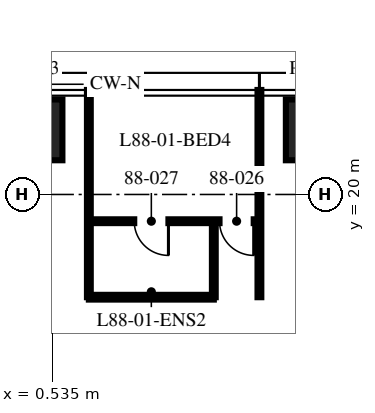
"""IFC4 building model, lengths in metres.
Left out: names, types, materials, properties, quantities, classifications, styles, units other than length and angle.
Written with IfcOpenShell. Run it as: python <this file> out.ifc"""

import sys

from ifc_helpers import new_model, si_unit, direction, frame, frame_2d, origin, origin_2d, place, context, subcontext, project, spatial, rectangle, extrude, element, fill, save


model = new_model("IFC4")
c1 = context("Model", 3, precision=1e-05, world=origin(), true_north=direction((0.0, 1.0)))
c2 = subcontext(c1, "Body", "Model", "MODEL_VIEW")
j1 = project(units=[si_unit("LENGTHUNIT", "METRE"), si_unit("PLANEANGLEUNIT", "RADIAN")], contexts=[c1])
p1 = place(None, origin())
s1 = spatial("IfcSite", under=j1, at=p1, CompositionType="ELEMENT")
p2 = place(p1, origin())
s2 = spatial("IfcBuilding", under=s1, at=p2, CompositionType="ELEMENT")
p3 = place(p2, frame((0.0, 0.0, 349.5)))
s3 = spatial("IfcBuildingStorey", under=s2, at=p3, CompositionType="ELEMENT", Elevation=349.5)
for number, where, z_axis, x_axis in (
    (1, (0.0, 21.7, 0.0), (0.0, 0.0, 1.0), (1.0, 0.0, 0.0)),
    (2, (7.48, 21.7, 0.0), (0.0, 0.0, 1.0), (1.0, 0.0, 0.0)),
):
    element("IfcColumn", number, at=place(p3, frame(where, z_axis=z_axis, x_axis=x_axis)), inside=s3, PredefinedType="COLUMN", context=c2, shape_type="SweptSolid", body=[
        extrude(rectangle(XDim=1.6, YDim=1.6, at=origin_2d()), origin(), (0.0, 0.0, 1.0), 3.75),
    ])
for number, where, z_axis, x_axis in (
    (3, (5.984, 17.296, 0.0), (0.0, 0.0, 1.0), (0.0, 1.0, 0.0)),
    (4, (1.496, 17.296, 0.0), (0.0, 0.0, 1.0), (0.0, 1.0, 0.0)),
):
    element("IfcWall", number, at=place(p3, frame(where, z_axis=z_axis, x_axis=x_axis)), inside=s3, PredefinedType="PARTITIONING", context=c2, shape_type="SweptSolid", body=[
        extrude(rectangle(XDim=5.454, YDim=0.1, at=frame_2d((2.727, 0.0))), origin(), (0.0, 0.0, 1.0), 2.85),
    ])
p4 = place(p3, frame((5.984, 19.296, 0.0), z_axis=(0.0, 0.0, 1.0), x_axis=(-1.0, 0.0, 0.0)))
e5 = element("IfcWall", 5, at=p4, inside=s3, PredefinedType="PARTITIONING", context=c2, shape_type="SweptSolid", body=[
    extrude(rectangle(XDim=4.488, YDim=0.1, at=frame_2d((2.244, 0.0))), origin(), (0.0, 0.0, 1.0), 2.56),
])
p5 = place(p4, frame((0.15, 0.0, 0.0)))
e6 = element("IfcOpeningElement", 6, at=p5, cuts=e5, PredefinedType="OPENING", context=c2, shape_type="SweptSolid", body=[
    extrude(rectangle(XDim=0.9, YDim=2.1, at=frame_2d((0.45, 1.05))), frame((0.0, 0.06, 0.0), z_axis=(0.0, -1.0, 0.0), x_axis=(1.0, 0.0, 0.0)), (0.0, 0.0, 1.0), 0.12),
])
p6 = place(p4, frame((2.394, 0.0, 0.0)))
e7 = element("IfcOpeningElement", 7, at=p6, cuts=e5, PredefinedType="OPENING", context=c2, shape_type="SweptSolid", body=[
    extrude(rectangle(XDim=0.9, YDim=2.1, at=frame_2d((0.45, 1.05))), frame((0.0, 0.06, 0.0), z_axis=(0.0, -1.0, 0.0), x_axis=(1.0, 0.0, 0.0)), (0.0, 0.0, 1.0), 0.12),
])
p7 = place(p3, frame((4.784, 17.296, 0.0), z_axis=(0.0, 0.0, 1.0), x_axis=(0.0, 1.0, 0.0)))
e8 = element("IfcWall", 8, at=p7, inside=s3, PredefinedType="PARTITIONING", context=c2, shape_type="SweptSolid", body=[
    extrude(rectangle(XDim=2.0, YDim=0.1, at=frame_2d((1.0, 0.0))), origin(), (0.0, 0.0, 1.0), 3.45),
])
p8 = place(p3, frame((4.784, 17.296, 0.0), z_axis=(0.0, 0.0, 1.0), x_axis=(-1.0, 0.0, 0.0)))
e9 = element("IfcWall", 9, at=p8, inside=s3, PredefinedType="PARTITIONING", context=c2, shape_type="SweptSolid", body=[
    extrude(rectangle(XDim=3.288, YDim=0.125, at=frame_2d((1.644, 0.0))), origin(), (0.0, 0.0, 1.0), 2.56),
])
p9 = place(p5, origin())
e10 = element("IfcDoor", 10, at=p9, inside=s3, OperationType="SINGLE_SWING_LEFT", PredefinedType="DOOR", context=c2, shape_type="SweptSolid", body=[
    extrude(rectangle(XDim=0.9, YDim=2.1, at=frame_2d((0.45, 1.05))), frame((0.0, 0.025, 0.0), z_axis=(0.0, -1.0, 0.0), x_axis=(1.0, 0.0, 0.0)), (0.0, 0.0, 1.0), 0.05),
])
fill(e6, e10)
p10 = place(p6, origin())
e11 = element("IfcDoor", 11, at=p10, inside=s3, OperationType="SINGLE_SWING_LEFT", PredefinedType="DOOR", context=c2, shape_type="SweptSolid", body=[
    extrude(rectangle(XDim=0.9, YDim=2.1, at=frame_2d((0.45, 1.05))), frame((0.0, 0.025, 0.0), z_axis=(0.0, -1.0, 0.0), x_axis=(1.0, 0.0, 0.0)), (0.0, 0.0, 1.0), 0.05),
])
fill(e7, e11)
save(model, sys.argv[1])
